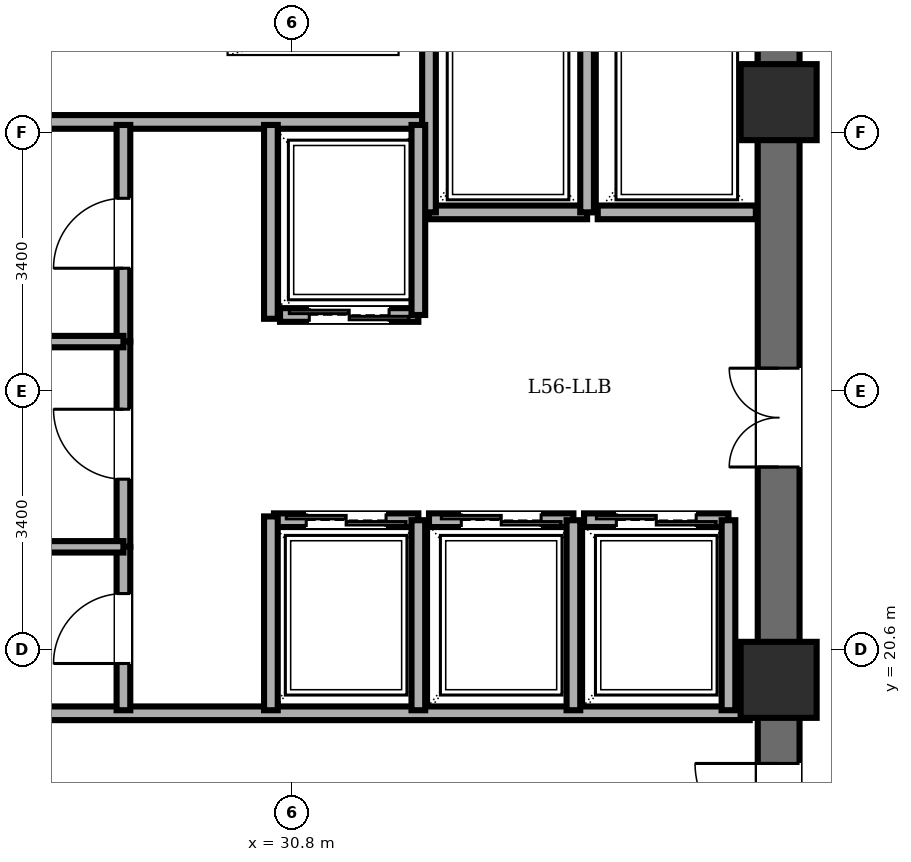
"""IFC4 building model, lengths in metres.
Left out: names, types, materials, properties, quantities, classifications, styles, units other than length and angle.
Written with IfcOpenShell. Run it as: python <this file> out.ifc"""

import sys

from ifc_helpers import new_model, si_unit, direction, frame, frame_2d, origin, origin_2d, place, context, subcontext, project, spatial, rectangle, extrude, element, fill, save


model = new_model("IFC4")
c1 = context("Model", 3, precision=1e-05, world=origin(), true_north=direction((0.0, 1.0)))
c2 = subcontext(c1, "Body", "Model", "MODEL_VIEW")
j1 = project(units=[si_unit("LENGTHUNIT", "METRE"), si_unit("PLANEANGLEUNIT", "RADIAN")], contexts=[c1])
p1 = place(None, origin())
s1 = spatial("IfcSite", under=j1, at=p1, CompositionType="ELEMENT")
p2 = place(p1, origin())
s2 = spatial("IfcBuilding", under=s1, at=p2, CompositionType="ELEMENT")
p3 = place(p2, frame((0.0, 0.0, 215.7)))
s3 = spatial("IfcBuildingStorey", under=s2, at=p3, CompositionType="ELEMENT", Elevation=215.7)
for number, where, z_axis, x_axis in (
    (1, (37.2, 20.2, 0.0), (0.0, 0.0, 1.0), (1.0, 0.0, 0.0)),
    (2, (37.2, 27.8, 0.0), (0.0, 0.0, 1.0), (1.0, 0.0, 0.0)),
):
    element("IfcColumn", number, at=place(p3, frame(where, z_axis=z_axis, x_axis=x_axis)), inside=s3, PredefinedType="COLUMN", context=c2, shape_type="SweptSolid", body=[
        extrude(rectangle(XDim=1.0, YDim=1.0, at=origin_2d()), origin(), (0.0, 0.0, 1.0), 3.6),
    ])
p4 = place(p3, frame((37.2, 14.4, 0.0), z_axis=(0.0, 0.0, 1.0), x_axis=(0.0, 1.0, 0.0)))
e3 = element("IfcWall", 3, at=p4, inside=s3, PredefinedType="SHEAR", context=c2, shape_type="SweptSolid", body=[
    extrude(rectangle(XDim=19.2, YDim=0.55, at=frame_2d((9.6, 0.0))), origin(), (0.0, 0.0, 1.0), 3.4),
])
p5 = place(p4, frame((15.8, 0.0, 0.0)))
e4 = element("IfcOpeningElement", 4, at=p5, cuts=e3, PredefinedType="OPENING", context=c2, shape_type="SweptSolid", body=[
    extrude(rectangle(XDim=1.15, YDim=2.15, at=frame_2d((0.575, 1.075))), frame((0.0, 0.285, 0.0), z_axis=(0.0, -1.0, 0.0), x_axis=(1.0, 0.0, 0.0)), (0.0, 0.0, 1.0), 0.57),
])
p6 = place(p4, frame((3.6, 0.0, 0.0)))
e5 = element("IfcOpeningElement", 5, at=p6, cuts=e3, PredefinedType="OPENING", context=c2, shape_type="SweptSolid", body=[
    extrude(rectangle(XDim=1.1, YDim=2.15, at=frame_2d((0.55, 1.075))), frame((0.0, 0.285, 0.0), z_axis=(0.0, -1.0, 0.0), x_axis=(1.0, 0.0, 0.0)), (0.0, 0.0, 1.0), 0.57),
])
p7 = place(p4, frame((8.6, 0.0, 0.0)))
e6 = element("IfcOpeningElement", 6, at=p7, cuts=e3, PredefinedType="OPENING", context=c2, shape_type="SweptSolid", body=[
    extrude(rectangle(XDim=1.3, YDim=2.2, at=frame_2d((0.65, 1.1))), frame((0.0, 0.285, 0.0), z_axis=(0.0, -1.0, 0.0), x_axis=(1.0, 0.0, 0.0)), (0.0, 0.0, 1.0), 0.57),
])
p8 = place(p3, frame((21.95, 27.54, 0.0), z_axis=(0.0, 0.0, 1.0), x_axis=(1.0, 0.0, 0.0)))
e7 = element("IfcWall", 7, at=p8, inside=s3, PredefinedType="PARTITIONING", context=c2, shape_type="SweptSolid", body=[
    extrude(rectangle(XDim=10.56, YDim=0.18, at=frame_2d((5.28, 0.0))), origin(), (0.0, 0.0, 1.0), 3.4),
])
p9 = place(p3, frame((21.95, 19.76, 0.0), z_axis=(0.0, 0.0, 1.0), x_axis=(1.0, 0.0, 0.0)))
e8 = element("IfcWall", 8, at=p9, inside=s3, PredefinedType="PARTITIONING", context=c2, shape_type="SweptSolid", body=[
    extrude(rectangle(XDim=14.87, YDim=0.18, at=frame_2d((7.435, 0.0))), origin(), (0.0, 0.0, 1.0), 3.4),
])
p10 = place(p3, frame((34.68, 26.35, 0.0), z_axis=(0.0, 0.0, 1.0), x_axis=(-1.0, 0.0, 0.0)))
e9 = element("IfcWall", 9, at=p10, inside=s3, PredefinedType="PARTITIONING", context=c2, shape_type="SweptSolid", body=[
    extrude(rectangle(XDim=2.08, YDim=0.18, at=frame_2d((1.04, 0.0))), origin(), (0.0, 0.0, 1.0), 3.4),
])
for number, where, z_axis, x_axis in (
    (10, (34.68, 26.35, 0.0), (0.0, 0.0, 1.0), (0.0, 1.0, 0.0)),
    (11, (32.6, 29.08, 0.0), (0.0, 0.0, 1.0), (0.0, -1.0, 0.0)),
):
    element("IfcWall", number, at=place(p3, frame(where, z_axis=z_axis, x_axis=x_axis)), inside=s3, PredefinedType="PARTITIONING", context=c2, shape_type="SweptSolid", body=[
        extrude(rectangle(XDim=2.73, YDim=0.18, at=frame_2d((1.365, 0.0))), origin(), (0.0, 0.0, 1.0), 3.4),
    ])
p11 = place(p3, frame((36.9, 26.35, 0.0), z_axis=(0.0, 0.0, 1.0), x_axis=(-1.0, 0.0, 0.0)))
e12 = element("IfcWall", 12, at=p11, inside=s3, PredefinedType="PARTITIONING", context=c2, shape_type="SweptSolid", body=[
    extrude(rectangle(XDim=2.08, YDim=0.18, at=frame_2d((1.04, 0.0))), origin(), (0.0, 0.0, 1.0), 3.4),
])
p12 = place(p3, frame((32.46, 25.0, 0.0), z_axis=(0.0, 0.0, 1.0), x_axis=(-1.0, 0.0, 0.0)))
e13 = element("IfcWall", 13, at=p12, inside=s3, PredefinedType="PARTITIONING", context=c2, shape_type="SweptSolid", body=[
    extrude(rectangle(XDim=1.82, YDim=0.18, at=frame_2d((0.91, 0.0))), origin(), (0.0, 0.0, 1.0), 3.4),
])
p13 = place(p12, frame((0.385, 0.0, 0.0)))
e14 = element("IfcOpeningElement", 14, at=p13, cuts=e13, PredefinedType="OPENING", context=c2, shape_type="SweptSolid", body=[
    extrude(rectangle(XDim=1.05, YDim=2.2, at=frame_2d((0.525, 1.1))), frame((0.0, 0.1, 0.0), z_axis=(0.0, -1.0, 0.0), x_axis=(1.0, 0.0, 0.0)), (0.0, 0.0, 1.0), 0.2),
])
p14 = place(p3, frame((32.46, 25.0, 0.0), z_axis=(0.0, 0.0, 1.0), x_axis=(0.0, 1.0, 0.0)))
e15 = element("IfcWall", 15, at=p14, inside=s3, PredefinedType="PARTITIONING", context=c2, shape_type="SweptSolid", body=[
    extrude(rectangle(XDim=2.5, YDim=0.18, at=frame_2d((1.25, 0.0))), origin(), (0.0, 0.0, 1.0), 3.4),
])
p15 = place(p3, frame((30.56, 22.3, 0.0), z_axis=(0.0, 0.0, 1.0), x_axis=(1.0, 0.0, 0.0)))
e16 = element("IfcWall", 16, at=p15, inside=s3, PredefinedType="PARTITIONING", context=c2, shape_type="SweptSolid", body=[
    extrude(rectangle(XDim=1.9, YDim=0.18, at=frame_2d((0.95, 0.0))), origin(), (0.0, 0.0, 1.0), 3.4),
])
p16 = place(p15, frame((0.425, 0.0, 0.0)))
e17 = element("IfcOpeningElement", 17, at=p16, cuts=e16, PredefinedType="OPENING", context=c2, shape_type="SweptSolid", body=[
    extrude(rectangle(XDim=1.05, YDim=2.2, at=frame_2d((0.525, 1.1))), frame((0.0, 0.1, 0.0), z_axis=(0.0, -1.0, 0.0), x_axis=(1.0, 0.0, 0.0)), (0.0, 0.0, 1.0), 0.2),
])
p17 = place(p3, frame((32.46, 19.8, 0.0), z_axis=(0.0, 0.0, 1.0), x_axis=(0.0, 1.0, 0.0)))
e18 = element("IfcWall", 18, at=p17, inside=s3, PredefinedType="PARTITIONING", context=c2, shape_type="SweptSolid", body=[
    extrude(rectangle(XDim=2.5, YDim=0.18, at=frame_2d((1.25, 0.0))), origin(), (0.0, 0.0, 1.0), 3.4),
])
p18 = place(p3, frame((32.6, 22.3, 0.0), z_axis=(0.0, 0.0, 1.0), x_axis=(1.0, 0.0, 0.0)))
e19 = element("IfcWall", 19, at=p18, inside=s3, PredefinedType="PARTITIONING", context=c2, shape_type="SweptSolid", body=[
    extrude(rectangle(XDim=1.9, YDim=0.18, at=frame_2d((0.95, 0.0))), origin(), (0.0, 0.0, 1.0), 3.4),
])
p19 = place(p18, frame((0.425, 0.0, 0.0)))
e20 = element("IfcOpeningElement", 20, at=p19, cuts=e19, PredefinedType="OPENING", context=c2, shape_type="SweptSolid", body=[
    extrude(rectangle(XDim=1.05, YDim=2.2, at=frame_2d((0.525, 1.1))), frame((0.0, 0.1, 0.0), z_axis=(0.0, -1.0, 0.0), x_axis=(1.0, 0.0, 0.0)), (0.0, 0.0, 1.0), 0.2),
])
p20 = place(p3, frame((34.5, 19.8, 0.0), z_axis=(0.0, 0.0, 1.0), x_axis=(0.0, 1.0, 0.0)))
e21 = element("IfcWall", 21, at=p20, inside=s3, PredefinedType="PARTITIONING", context=c2, shape_type="SweptSolid", body=[
    extrude(rectangle(XDim=2.5, YDim=0.18, at=frame_2d((1.25, 0.0))), origin(), (0.0, 0.0, 1.0), 3.4),
])
p21 = place(p3, frame((34.64, 22.3, 0.0), z_axis=(0.0, 0.0, 1.0), x_axis=(1.0, 0.0, 0.0)))
e22 = element("IfcWall", 22, at=p21, inside=s3, PredefinedType="PARTITIONING", context=c2, shape_type="SweptSolid", body=[
    extrude(rectangle(XDim=1.9, YDim=0.18, at=frame_2d((0.95, 0.0))), origin(), (0.0, 0.0, 1.0), 3.4),
])
p22 = place(p21, frame((0.425, 0.0, 0.0)))
e23 = element("IfcOpeningElement", 23, at=p22, cuts=e22, PredefinedType="OPENING", context=c2, shape_type="SweptSolid", body=[
    extrude(rectangle(XDim=1.05, YDim=2.2, at=frame_2d((0.525, 1.1))), frame((0.0, 0.1, 0.0), z_axis=(0.0, -1.0, 0.0), x_axis=(1.0, 0.0, 0.0)), (0.0, 0.0, 1.0), 0.2),
])
p23 = place(p3, frame((36.54, 19.8, 0.0), z_axis=(0.0, 0.0, 1.0), x_axis=(0.0, 1.0, 0.0)))
e24 = element("IfcWall", 24, at=p23, inside=s3, PredefinedType="PARTITIONING", context=c2, shape_type="SweptSolid", body=[
    extrude(rectangle(XDim=2.5, YDim=0.18, at=frame_2d((1.25, 0.0))), origin(), (0.0, 0.0, 1.0), 3.4),
])
for number, where, z_axis, x_axis in (
    (25, (30.52, 24.95, 0.0), (0.0, 0.0, 1.0), (0.0, 1.0, 0.0)),
    (26, (30.52, 19.8, 0.0), (0.0, 0.0, 1.0), (0.0, 1.0, 0.0)),
):
    element("IfcWall", number, at=place(p3, frame(where, z_axis=z_axis, x_axis=x_axis)), inside=s3, PredefinedType="PARTITIONING", context=c2, shape_type="SweptSolid", body=[
        extrude(rectangle(XDim=2.55, YDim=0.18, at=frame_2d((1.275, 0.0))), origin(), (0.0, 0.0, 1.0), 3.4),
    ])
p24 = place(p3, frame((28.58, 24.65, 0.0), z_axis=(0.0, 0.0, 1.0), x_axis=(0.0, 1.0, 0.0)))
e27 = element("IfcWall", 27, at=p24, inside=s3, PredefinedType="PARTITIONING", context=c2, shape_type="SweptSolid", body=[
    extrude(rectangle(XDim=2.85, YDim=0.18, at=frame_2d((1.425, 0.0))), origin(), (0.0, 0.0, 1.0), 3.4),
])
p25 = place(p24, frame((0.965, 0.0, 0.0)))
e28 = element("IfcOpeningElement", 28, at=p25, cuts=e27, PredefinedType="OPENING", context=c2, shape_type="SweptSolid", body=[
    extrude(rectangle(XDim=0.92, YDim=2.1, at=frame_2d((0.46, 1.05))), frame((0.0, 0.1, 0.0), z_axis=(0.0, -1.0, 0.0), x_axis=(1.0, 0.0, 0.0)), (0.0, 0.0, 1.0), 0.2),
])
p26 = place(p3, frame((28.58, 21.95, 0.0), z_axis=(0.0, 0.0, 1.0), x_axis=(0.0, 1.0, 0.0)))
e29 = element("IfcWall", 29, at=p26, inside=s3, PredefinedType="PARTITIONING", context=c2, shape_type="SweptSolid", body=[
    extrude(rectangle(XDim=2.7, YDim=0.18, at=frame_2d((1.35, 0.0))), origin(), (0.0, 0.0, 1.0), 3.4),
])
p27 = place(p26, frame((0.89, 0.0, 0.0)))
e30 = element("IfcOpeningElement", 30, at=p27, cuts=e29, PredefinedType="OPENING", context=c2, shape_type="SweptSolid", body=[
    extrude(rectangle(XDim=0.92, YDim=2.1, at=frame_2d((0.46, 1.05))), frame((0.0, 0.1, 0.0), z_axis=(0.0, -1.0, 0.0), x_axis=(1.0, 0.0, 0.0)), (0.0, 0.0, 1.0), 0.2),
])
p28 = place(p3, frame((28.58, 19.8, 0.0), z_axis=(0.0, 0.0, 1.0), x_axis=(0.0, 1.0, 0.0)))
e31 = element("IfcWall", 31, at=p28, inside=s3, PredefinedType="PARTITIONING", context=c2, shape_type="SweptSolid", body=[
    extrude(rectangle(XDim=2.15, YDim=0.18, at=frame_2d((1.075, 0.0))), origin(), (0.0, 0.0, 1.0), 3.4),
])
p29 = place(p28, frame((0.615, 0.0, 0.0)))
e32 = element("IfcOpeningElement", 32, at=p29, cuts=e31, PredefinedType="OPENING", context=c2, shape_type="SweptSolid", body=[
    extrude(rectangle(XDim=0.92, YDim=2.1, at=frame_2d((0.46, 1.05))), frame((0.0, 0.1, 0.0), z_axis=(0.0, -1.0, 0.0), x_axis=(1.0, 0.0, 0.0)), (0.0, 0.0, 1.0), 0.2),
])
for number, where, z_axis, x_axis in (
    (33, (21.95, 24.65, 0.0), (0.0, 0.0, 1.0), (1.0, 0.0, 0.0)),
    (34, (21.95, 21.95, 0.0), (0.0, 0.0, 1.0), (1.0, 0.0, 0.0)),
):
    element("IfcWall", number, at=place(p3, frame(where, z_axis=z_axis, x_axis=x_axis)), inside=s3, PredefinedType="PARTITIONING", context=c2, shape_type="SweptSolid", body=[
        extrude(rectangle(XDim=6.63, YDim=0.15, at=frame_2d((3.315, 0.0))), origin(), (0.0, 0.0, 1.0), 3.4),
    ])
p30 = place(p6, origin())
e35 = element("IfcDoor", 35, at=p30, inside=s3, OperationType="SINGLE_SWING_RIGHT", PredefinedType="DOOR", context=c2, shape_type="SweptSolid", body=[
    extrude(rectangle(XDim=1.1, YDim=2.15, at=frame_2d((0.55, 1.075))), frame((0.0, 0.025, 0.0), z_axis=(0.0, -1.0, 0.0), x_axis=(1.0, 0.0, 0.0)), (0.0, 0.0, 1.0), 0.05),
])
fill(e5, e35)
p31 = place(p13, origin())
e36 = element("IfcDoor", 36, at=p31, inside=s3, OperationType="DOUBLE_DOOR_SLIDING", PredefinedType="DOOR", context=c2, shape_type="SweptSolid", body=[
    extrude(rectangle(XDim=1.05, YDim=2.2, at=frame_2d((0.525, 1.1))), frame((0.0, 0.025, 0.0), z_axis=(0.0, -1.0, 0.0), x_axis=(1.0, 0.0, 0.0)), (0.0, 0.0, 1.0), 0.05),
])
fill(e14, e36)
p32 = place(p16, origin())
e37 = element("IfcDoor", 37, at=p32, inside=s3, OperationType="DOUBLE_DOOR_SLIDING", PredefinedType="DOOR", context=c2, shape_type="SweptSolid", body=[
    extrude(rectangle(XDim=1.05, YDim=2.2, at=frame_2d((0.525, 1.1))), frame((0.0, 0.025, 0.0), z_axis=(0.0, -1.0, 0.0), x_axis=(1.0, 0.0, 0.0)), (0.0, 0.0, 1.0), 0.05),
])
fill(e17, e37)
p33 = place(p19, origin())
e38 = element("IfcDoor", 38, at=p33, inside=s3, OperationType="DOUBLE_DOOR_SLIDING", PredefinedType="DOOR", context=c2, shape_type="SweptSolid", body=[
    extrude(rectangle(XDim=1.05, YDim=2.2, at=frame_2d((0.525, 1.1))), frame((0.0, 0.025, 0.0), z_axis=(0.0, -1.0, 0.0), x_axis=(1.0, 0.0, 0.0)), (0.0, 0.0, 1.0), 0.05),
])
fill(e20, e38)
p34 = place(p22, origin())
e39 = element("IfcDoor", 39, at=p34, inside=s3, OperationType="DOUBLE_DOOR_SLIDING", PredefinedType="DOOR", context=c2, shape_type="SweptSolid", body=[
    extrude(rectangle(XDim=1.05, YDim=2.2, at=frame_2d((0.525, 1.1))), frame((0.0, 0.025, 0.0), z_axis=(0.0, -1.0, 0.0), x_axis=(1.0, 0.0, 0.0)), (0.0, 0.0, 1.0), 0.05),
])
fill(e23, e39)
p35 = place(p25, origin())
e40 = element("IfcDoor", 40, at=p35, inside=s3, OperationType="SINGLE_SWING_LEFT", PredefinedType="DOOR", context=c2, shape_type="SweptSolid", body=[
    extrude(rectangle(XDim=0.92, YDim=2.1, at=frame_2d((0.46, 1.05))), frame((0.0, 0.025, 0.0), z_axis=(0.0, -1.0, 0.0), x_axis=(1.0, 0.0, 0.0)), (0.0, 0.0, 1.0), 0.05),
])
fill(e28, e40)
p36 = place(p27, origin())
e41 = element("IfcDoor", 41, at=p36, inside=s3, OperationType="SINGLE_SWING_RIGHT", PredefinedType="DOOR", context=c2, shape_type="SweptSolid", body=[
    extrude(rectangle(XDim=0.92, YDim=2.1, at=frame_2d((0.46, 1.05))), frame((0.0, 0.025, 0.0), z_axis=(0.0, -1.0, 0.0), x_axis=(1.0, 0.0, 0.0)), (0.0, 0.0, 1.0), 0.05),
])
fill(e30, e41)
p37 = place(p29, origin())
e42 = element("IfcDoor", 42, at=p37, inside=s3, OperationType="SINGLE_SWING_LEFT", PredefinedType="DOOR", context=c2, shape_type="SweptSolid", body=[
    extrude(rectangle(XDim=0.92, YDim=2.1, at=frame_2d((0.46, 1.05))), frame((0.0, 0.025, 0.0), z_axis=(0.0, -1.0, 0.0), x_axis=(1.0, 0.0, 0.0)), (0.0, 0.0, 1.0), 0.05),
])
fill(e32, e42)
p38 = place(p7, origin())
e43 = element("IfcDoor", 43, at=p38, inside=s3, OperationType="DOUBLE_DOOR_SINGLE_SWING", PredefinedType="DOOR", context=c2, shape_type="SweptSolid", body=[
    extrude(rectangle(XDim=1.3, YDim=2.2, at=frame_2d((0.65, 1.1))), frame((0.0, 0.025, 0.0), z_axis=(0.0, -1.0, 0.0), x_axis=(1.0, 0.0, 0.0)), (0.0, 0.0, 1.0), 0.05),
])
fill(e6, e43)
save(model, sys.argv[1])
